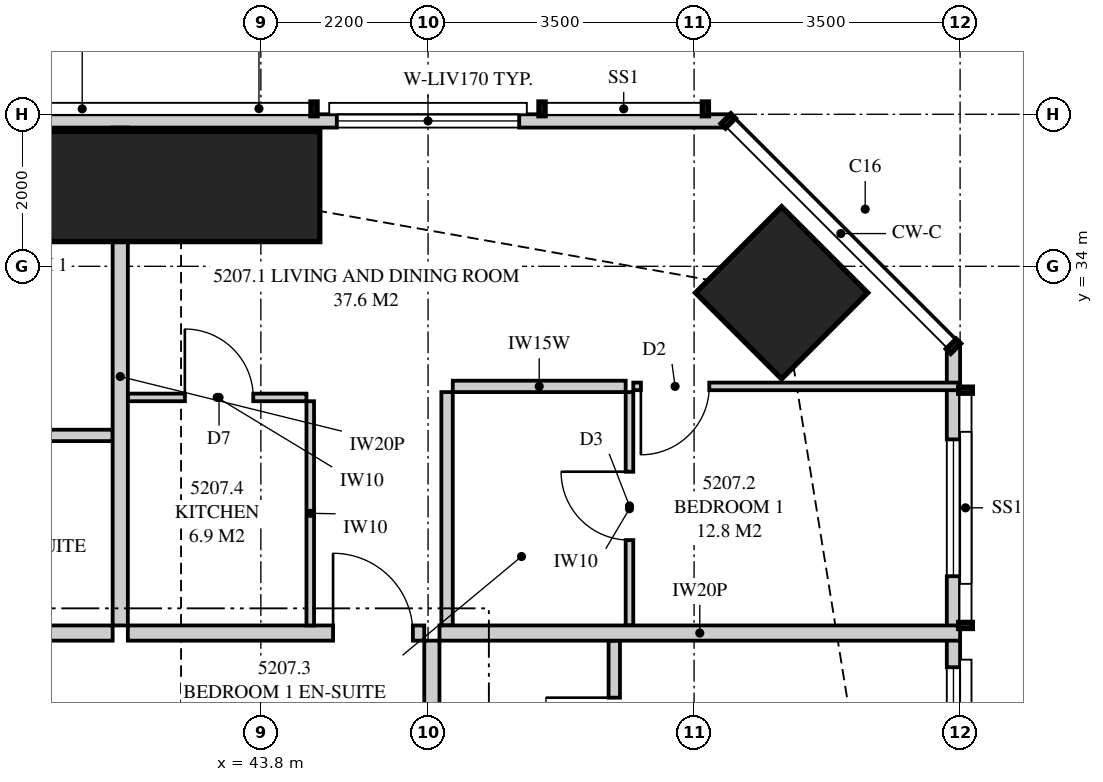
"""IFC4 building model, lengths in metres.
Left out: names, types, materials, properties, quantities, classifications, styles, units other than length and angle.
Written with IfcOpenShell. Run it as: python <this file> out.ifc"""

import sys

from ifc_helpers import new_model, si_unit, direction, frame, frame_2d, origin, origin_2d, place, context, subcontext, project, spatial, polyline, rectangle, outline, extrude, element, fill, save


model = new_model("IFC4")
c1 = context("Model", 3, precision=1e-05, world=origin(), true_north=direction((0.0, 1.0)))
c2 = subcontext(c1, "Body", "Model", "MODEL_VIEW")
j1 = project(units=[si_unit("LENGTHUNIT", "METRE"), si_unit("PLANEANGLEUNIT", "RADIAN")], contexts=[c1])
p1 = place(None, origin())
s1 = spatial("IfcSite", under=j1, at=p1, CompositionType="ELEMENT")
p2 = place(p1, origin())
s2 = spatial("IfcBuilding", under=s1, at=p2, CompositionType="ELEMENT")
p3 = place(p2, frame((0.0, 0.0, 191.2)))
s3 = spatial("IfcBuildingStorey", under=s2, at=p3, CompositionType="ELEMENT", Elevation=191.2)
p4 = place(p3, frame((50.652, 33.652, 0.0), z_axis=(0.0, 0.0, 1.0), x_axis=(0.707106781187, 0.707106781187, 0.0)))
e1 = element("IfcColumn", 1, at=p4, inside=s3, PredefinedType="COLUMN", context=c2, shape_type="SweptSolid", body=[
    extrude(rectangle(XDim=1.6, YDim=1.6, at=origin_2d()), origin(), (0.0, 0.0, 1.0), 3.35),
])
p5 = place(p3, frame((42.75, 35.05, 0.0), z_axis=(0.0, 0.0, 1.0), x_axis=(0.0, 1.0, 0.0)))
e2 = element("IfcColumn", 2, at=p5, inside=s3, PredefinedType="COLUMN", context=c2, shape_type="SweptSolid", body=[
    extrude(rectangle(XDim=1.45, YDim=3.65, at=origin_2d()), origin(), (0.0, 0.0, 1.0), 3.35),
])
p6 = place(p3, frame((52.913, 3.051, 0.0), z_axis=(0.0, 0.0, 1.0), x_axis=(0.0, 1.0, 0.0)))
e3 = element("IfcWall", 3, at=p6, inside=s3, PredefinedType="SOLIDWALL", context=c2, shape_type="SweptSolid", body=[
    extrude(outline(polyline([(0.0, 0.0), (29.897, 0.0), (29.897, 3.11), (22.167, 3.11), (22.167, 2.15), (22.074, 2.15), (22.074, 3.11), (21.949, 3.11), (21.949, 2.15), (9.949, 2.15), (9.949, 3.11), (9.847, 3.11), (9.847, 2.15), (9.706, 2.15), (9.706, 3.11), (0.0, 3.11), (0.0, 0.0)])), frame((0.0, 0.087, 0.0), z_axis=(0.0, -1.0, 0.0), x_axis=(1.0, 0.0, 0.0)), (0.0, 0.0, 1.0), 0.175),
])
p7 = place(p6, frame((1.137, 0.0, 0.4)))
e4 = element("IfcOpeningElement", 4, at=p7, cuts=e3, PredefinedType="OPENING", context=c2, shape_type="SweptSolid", body=[
    extrude(rectangle(XDim=2.4, YDim=1.7, at=frame_2d((1.2, 0.85))), frame((0.0, 0.097, 0.0), z_axis=(0.0, -1.0, 0.0), x_axis=(1.0, 0.0, 0.0)), (0.0, 0.0, 1.0), 0.195),
])
p8 = place(p6, frame((5.674, 0.0, 0.4)))
e5 = element("IfcOpeningElement", 5, at=p8, cuts=e3, PredefinedType="OPENING", context=c2, shape_type="SweptSolid", body=[
    extrude(rectangle(XDim=1.8, YDim=1.7, at=frame_2d((0.9, 0.85))), frame((0.0, 0.097, 0.0), z_axis=(0.0, -1.0, 0.0), x_axis=(1.0, 0.0, 0.0)), (0.0, 0.0, 1.0), 0.195),
])
p9 = place(p6, frame((11.902, 0.0, 0.4)))
e6 = element("IfcOpeningElement", 6, at=p9, cuts=e3, PredefinedType="OPENING", context=c2, shape_type="SweptSolid", body=[
    extrude(rectangle(XDim=2.4, YDim=1.7, at=frame_2d((1.2, 0.85))), frame((0.0, 0.097, 0.0), z_axis=(0.0, -1.0, 0.0), x_axis=(1.0, 0.0, 0.0)), (0.0, 0.0, 1.0), 0.195),
])
p10 = place(p6, frame((15.324, 0.0, 0.0)))
e7 = element("IfcOpeningElement", 7, at=p10, cuts=e3, PredefinedType="OPENING", context=c2, shape_type="SweptSolid", body=[
    extrude(rectangle(XDim=1.8, YDim=2.1, at=frame_2d((0.9, 1.05))), frame((0.0, 0.097, 0.0), z_axis=(0.0, -1.0, 0.0), x_axis=(1.0, 0.0, 0.0)), (0.0, 0.0, 1.0), 0.195),
])
p11 = place(p6, frame((23.874, 0.0, 0.4)))
e8 = element("IfcOpeningElement", 8, at=p11, cuts=e3, PredefinedType="OPENING", context=c2, shape_type="SweptSolid", body=[
    extrude(rectangle(XDim=1.8, YDim=1.7, at=frame_2d((0.9, 0.85))), frame((0.0, 0.097, 0.0), z_axis=(0.0, -1.0, 0.0), x_axis=(1.0, 0.0, 0.0)), (0.0, 0.0, 1.0), 0.195),
])
p12 = place(p6, frame((26.871, 0.0, 0.4)))
e9 = element("IfcOpeningElement", 9, at=p12, cuts=e3, PredefinedType="OPENING", context=c2, shape_type="SweptSolid", body=[
    extrude(rectangle(XDim=1.8, YDim=1.7, at=frame_2d((0.9, 0.85))), frame((0.0, 0.097, 0.0), z_axis=(0.0, -1.0, 0.0), x_axis=(1.0, 0.0, 0.0)), (0.0, 0.0, 1.0), 0.195),
])
p13 = place(p3, frame((49.949, 35.913, 0.0), z_axis=(0.0, 0.0, 1.0), x_axis=(-1.0, 0.0, 0.0)))
e10 = element("IfcWall", 10, at=p13, inside=s3, PredefinedType="SOLIDWALL", context=c2, shape_type="SweptSolid", body=[
    extrude(outline(polyline([(0.0, 0.0), (34.897, 0.0), (34.897, 3.11), (27.91, 3.11), (27.91, 2.15), (27.836, 2.15), (27.836, 3.11), (27.699, 3.11), (27.699, 2.15), (7.199, 2.15), (7.199, 3.11), (7.062, 3.11), (7.062, 2.15), (6.987, 2.15), (6.987, 3.11), (0.0, 3.11), (0.0, 0.0)])), frame((0.0, 0.087, 0.0), z_axis=(0.0, -1.0, 0.0), x_axis=(1.0, 0.0, 0.0)), (0.0, 0.0, 1.0), 0.175),
])
p14 = place(p13, frame((2.75, 0.0, 0.4)))
e11 = element("IfcOpeningElement", 11, at=p14, cuts=e10, PredefinedType="OPENING", context=c2, shape_type="SweptSolid", body=[
    extrude(rectangle(XDim=2.4, YDim=1.7, at=frame_2d((1.2, 0.85))), frame((0.0, 0.097, 0.0), z_axis=(0.0, -1.0, 0.0), x_axis=(1.0, 0.0, 0.0)), (0.0, 0.0, 1.0), 0.195),
])
p15 = place(p13, frame((9.124, 0.0, 0.4)))
e12 = element("IfcOpeningElement", 12, at=p15, cuts=e10, PredefinedType="OPENING", context=c2, shape_type="SweptSolid", body=[
    extrude(rectangle(XDim=1.8, YDim=1.7, at=frame_2d((0.9, 0.85))), frame((0.0, 0.097, 0.0), z_axis=(0.0, -1.0, 0.0), x_axis=(1.0, 0.0, 0.0)), (0.0, 0.0, 1.0), 0.195),
])
p16 = place(p13, frame((13.174, 0.0, 0.0)))
e13 = element("IfcOpeningElement", 13, at=p16, cuts=e10, PredefinedType="OPENING", context=c2, shape_type="SweptSolid", body=[
    extrude(rectangle(XDim=1.8, YDim=2.1, at=frame_2d((0.9, 1.05))), frame((0.0, 0.097, 0.0), z_axis=(0.0, -1.0, 0.0), x_axis=(1.0, 0.0, 0.0)), (0.0, 0.0, 1.0), 0.195),
])
p17 = place(p13, frame((19.849, 0.0, 0.4)))
e14 = element("IfcOpeningElement", 14, at=p17, cuts=e10, PredefinedType="OPENING", context=c2, shape_type="SweptSolid", body=[
    extrude(rectangle(XDim=1.8, YDim=1.7, at=frame_2d((0.9, 0.85))), frame((0.0, 0.097, 0.0), z_axis=(0.0, -1.0, 0.0), x_axis=(1.0, 0.0, 0.0)), (0.0, 0.0, 1.0), 0.195),
])
p18 = place(p13, frame((23.304, 0.0, 0.4)))
e15 = element("IfcOpeningElement", 15, at=p18, cuts=e10, PredefinedType="OPENING", context=c2, shape_type="SweptSolid", body=[
    extrude(rectangle(XDim=2.4, YDim=1.7, at=frame_2d((1.2, 0.85))), frame((0.0, 0.097, 0.0), z_axis=(0.0, -1.0, 0.0), x_axis=(1.0, 0.0, 0.0)), (0.0, 0.0, 1.0), 0.195),
])
p19 = place(p13, frame((30.249, 0.0, 0.4)))
e16 = element("IfcOpeningElement", 16, at=p19, cuts=e10, PredefinedType="OPENING", context=c2, shape_type="SweptSolid", body=[
    extrude(rectangle(XDim=1.8, YDim=1.7, at=frame_2d((0.9, 0.85))), frame((0.0, 0.097, 0.0), z_axis=(0.0, -1.0, 0.0), x_axis=(1.0, 0.0, 0.0)), (0.0, 0.0, 1.0), 0.195),
])
p20 = place(p3, frame((41.95, 35.825, 0.0), z_axis=(0.0, 0.0, 1.0), x_axis=(0.0, -1.0, 0.0)))
e17 = element("IfcWall", 17, at=p20, inside=s3, PredefinedType="PARTITIONING", context=c2, shape_type="SweptSolid", body=[
    extrude(outline(polyline([(0.529, 2.15), (0.0, 2.15), (0.0, 0.0), (0.529, 0.0), (0.529, 0.746), (1.021, 0.746), (1.021, 0.0), (6.55, 0.0), (6.55, 3.11), (1.685, 3.11), (1.685, 2.15), (1.021, 2.15), (1.021, 1.404), (0.529, 1.404), (0.529, 2.15)])), frame((0.0, 0.1, 0.0), z_axis=(0.0, -1.0, 0.0), x_axis=(1.0, 0.0, 0.0)), (0.0, 0.0, 1.0), 0.2),
])
p21 = place(p3, frame((38.4, 31.775, 0.0), z_axis=(0.0, 0.0, 1.0), x_axis=(1.0, 0.0, 0.0)))
e18 = element("IfcWall", 18, at=p21, inside=s3, PredefinedType="PLUMBINGWALL", context=c2, shape_type="SweptSolid", body=[
    extrude(rectangle(XDim=3.45, YDim=0.15, at=frame_2d((1.725, 0.0))), origin(), (0.0, 0.0, 1.0), 3.11),
])
p22 = place(p21, frame((0.4, 0.0, 0.0)))
e19 = element("IfcOpeningElement", 19, at=p22, cuts=e18, PredefinedType="OPENING", context=c2, shape_type="SweptSolid", body=[
    extrude(rectangle(XDim=0.9, YDim=2.1, at=frame_2d((0.45, 1.05))), frame((0.0, 0.085, 0.0), z_axis=(0.0, -1.0, 0.0), x_axis=(1.0, 0.0, 0.0)), (0.0, 0.0, 1.0), 0.17),
])
p23 = place(p3, frame((42.05, 29.175, 0.0), z_axis=(0.0, 0.0, 1.0), x_axis=(1.0, 0.0, 0.0)))
e20 = element("IfcWall", 20, at=p23, inside=s3, PredefinedType="PARTITIONING", context=c2, shape_type="SweptSolid", body=[
    extrude(outline(polyline([(0.0, 0.0), (3.9, 0.0), (3.9, 3.11), (1.037, 3.11), (1.037, 2.541), (0.363, 2.541), (0.363, 3.11), (0.0, 3.11), (0.0, 0.0)])), frame((0.0, 0.1, 0.0), z_axis=(0.0, -1.0, 0.0), x_axis=(1.0, 0.0, 0.0)), (0.0, 0.0, 1.0), 0.2),
])
p24 = place(p23, frame((2.7, 0.0, 0.0)))
e21 = element("IfcOpeningElement", 21, at=p24, cuts=e20, PredefinedType="OPENING", context=c2, shape_type="SweptSolid", body=[
    extrude(rectangle(XDim=1.05, YDim=2.2, at=frame_2d((0.525, 1.1))), frame((0.0, 0.11, 0.0), z_axis=(0.0, -1.0, 0.0), x_axis=(1.0, 0.0, 0.0)), (0.0, 0.0, 1.0), 0.22),
])
p25 = place(p3, frame((48.65, 32.345, 0.0), z_axis=(0.0, 0.0, 1.0), x_axis=(0.0, -1.0, 0.0)))
e22 = element("IfcWall", 22, at=p25, inside=s3, PredefinedType="PARTITIONING", context=c2, shape_type="SweptSolid", body=[
    extrude(rectangle(XDim=3.07, YDim=0.1, at=frame_2d((1.535, 0.0))), origin(), (0.0, 0.0, 1.0), 3.11),
])
p26 = place(p25, frame((1.048, 0.0, 0.0)))
e23 = element("IfcOpeningElement", 23, at=p26, cuts=e22, PredefinedType="OPENING", context=c2, shape_type="SweptSolid", body=[
    extrude(rectangle(XDim=0.9, YDim=2.1, at=frame_2d((0.45, 1.05))), frame((0.0, 0.06, 0.0), z_axis=(0.0, -1.0, 0.0), x_axis=(1.0, 0.0, 0.0)), (0.0, 0.0, 1.0), 0.12),
])
p27 = place(p3, frame((48.7, 32.42, 0.0), z_axis=(0.0, 0.0, 1.0), x_axis=(1.0, 0.0, 0.0)))
e24 = element("IfcWall", 24, at=p27, inside=s3, PredefinedType="PARTITIONING", context=c2, shape_type="SweptSolid", body=[
    extrude(outline(polyline([(0.0, 0.0), (4.3, 0.0), (4.3, 3.11), (3.022, 3.11), (3.022, 2.15), (1.279, 2.15), (1.279, 3.11), (0.0, 3.11), (0.0, 0.0)])), frame((0.0, 0.05, 0.0), z_axis=(0.0, -1.0, 0.0), x_axis=(1.0, 0.0, 0.0)), (0.0, 0.0, 1.0), 0.1),
])
p28 = place(p27, frame((0.1, 0.0, 0.0)))
e25 = element("IfcOpeningElement", 25, at=p28, cuts=e24, PredefinedType="OPENING", context=c2, shape_type="SweptSolid", body=[
    extrude(rectangle(XDim=0.9, YDim=2.1, at=frame_2d((0.45, 1.05))), frame((0.0, 0.06, 0.0), z_axis=(0.0, -1.0, 0.0), x_axis=(1.0, 0.0, 0.0)), (0.0, 0.0, 1.0), 0.12),
])
p29 = place(p3, frame((46.325, 32.42, 0.0), z_axis=(0.0, 0.0, 1.0), x_axis=(1.0, 0.0, 0.0)))
e26 = element("IfcWall", 26, at=p29, inside=s3, PredefinedType="PLUMBINGWALL", context=c2, shape_type="SweptSolid", body=[
    extrude(rectangle(XDim=2.275, YDim=0.15, at=frame_2d((1.138, 0.0))), origin(), (0.0, 0.0, 1.0), 3.11),
])
p30 = place(p3, frame((46.25, 32.345, 0.0), z_axis=(0.0, 0.0, 1.0), x_axis=(0.0, -1.0, 0.0)))
e27 = element("IfcWall", 27, at=p30, inside=s3, PredefinedType="PLUMBINGWALL", context=c2, shape_type="SweptSolid", body=[
    extrude(rectangle(XDim=3.07, YDim=0.15, at=frame_2d((1.535, 0.0))), origin(), (0.0, 0.0, 1.0), 3.11),
])
p31 = place(p3, frame((42.05, 32.275, 0.0), z_axis=(0.0, 0.0, 1.0), x_axis=(1.0, 0.0, 0.0)))
e28 = element("IfcWall", 28, at=p31, inside=s3, PredefinedType="PARTITIONING", context=c2, shape_type="SweptSolid", body=[
    extrude(outline(polyline([(0.0, 0.0), (2.35, 0.0), (2.35, 3.11), (0.987, 3.11), (0.987, 2.541), (0.413, 2.541), (0.413, 3.11), (0.0, 3.11), (0.0, 0.0)])), frame((0.0, 0.05, 0.0), z_axis=(0.0, -1.0, 0.0), x_axis=(1.0, 0.0, 0.0)), (0.0, 0.0, 1.0), 0.1),
])
p32 = place(p31, frame((0.75, 0.0, 0.0)))
e29 = element("IfcOpeningElement", 29, at=p32, cuts=e28, PredefinedType="OPENING", context=c2, shape_type="SweptSolid", body=[
    extrude(rectangle(XDim=0.9, YDim=2.1, at=frame_2d((0.45, 1.05))), frame((0.0, 0.06, 0.0), z_axis=(0.0, -1.0, 0.0), x_axis=(1.0, 0.0, 0.0)), (0.0, 0.0, 1.0), 0.12),
])
p33 = place(p3, frame((44.45, 32.225, 0.0), z_axis=(0.0, 0.0, 1.0), x_axis=(0.0, -1.0, 0.0)))
e30 = element("IfcWall", 30, at=p33, inside=s3, PredefinedType="PARTITIONING", context=c2, shape_type="SweptSolid", body=[
    extrude(rectangle(XDim=2.95, YDim=0.1, at=frame_2d((1.475, 0.0))), origin(), (0.0, 0.0, 1.0), 3.11),
])
p34 = place(p3, frame((46.15, 29.175, 0.0), z_axis=(0.0, 0.0, 1.0), x_axis=(1.0, 0.0, 0.0)))
e31 = element("IfcWall", 31, at=p34, inside=s3, PredefinedType="PARTITIONING", context=c2, shape_type="SweptSolid", body=[
    extrude(outline(polyline([(0.0, 0.0), (6.85, 0.0), (6.85, 3.11), (6.147, 3.11), (6.147, 2.15), (4.303, 2.15), (4.303, 3.11), (0.0, 3.11), (0.0, 0.0)])), frame((0.0, 0.1, 0.0), z_axis=(0.0, -1.0, 0.0), x_axis=(1.0, 0.0, 0.0)), (0.0, 0.0, 1.0), 0.2),
])
p35 = place(p3, frame((48.45, 26.65, 0.0), z_axis=(0.0, 0.0, 1.0), x_axis=(0.0, 1.0, 0.0)))
e32 = element("IfcWall", 32, at=p35, inside=s3, PredefinedType="PLUMBINGWALL", context=c2, shape_type="SweptSolid", body=[
    extrude(rectangle(XDim=2.425, YDim=0.15, at=frame_2d((1.212, 0.0))), origin(), (0.0, 0.0, 1.0), 3.11),
])
p36 = place(p35, frame((0.775, 0.0, 0.0)))
e33 = element("IfcOpeningElement", 33, at=p36, cuts=e32, PredefinedType="OPENING", context=c2, shape_type="SweptSolid", body=[
    extrude(rectangle(XDim=0.9, YDim=2.1, at=frame_2d((0.45, 1.05))), frame((0.0, 0.085, 0.0), z_axis=(0.0, -1.0, 0.0), x_axis=(1.0, 0.0, 0.0)), (0.0, 0.0, 1.0), 0.17),
])
p37 = place(p3, frame((37.875, 29.175, 0.0), z_axis=(0.0, 0.0, 1.0), x_axis=(1.0, 0.0, 0.0)))
e34 = element("IfcWall", 34, at=p37, inside=s3, PredefinedType="PARTITIONING", context=c2, shape_type="SweptSolid", body=[
    extrude(rectangle(XDim=3.975, YDim=0.2, at=frame_2d((1.988, 0.0))), origin(), (0.0, 0.0, 1.0), 3.11),
])
p38 = place(p3, frame((46.05, 26.488, 0.0), z_axis=(0.0, 0.0, 1.0), x_axis=(0.0, 1.0, 0.0)))
e35 = element("IfcWall", 35, at=p38, inside=s3, PredefinedType="PARTITIONING", context=c2, shape_type="SweptSolid", body=[
    extrude(rectangle(XDim=2.587, YDim=0.2, at=frame_2d((1.294, 0.0))), origin(), (0.0, 0.0, 1.0), 3.11),
])
p39 = place(p11, origin())
e36 = element("IfcWindow", 36, at=p39, inside=s3, PartitioningType="SINGLE_PANEL", PredefinedType="WINDOW", context=c2, shape_type="SweptSolid", body=[
    extrude(rectangle(XDim=1.8, YDim=1.7, at=frame_2d((0.9, 0.85))), frame((0.0, 0.03, 0.0), z_axis=(0.0, -1.0, 0.0), x_axis=(1.0, 0.0, 0.0)), (0.0, 0.0, 1.0), 0.06),
])
fill(e8, e36)
p40 = place(p12, origin())
e37 = element("IfcWindow", 37, at=p40, inside=s3, PartitioningType="SINGLE_PANEL", PredefinedType="WINDOW", context=c2, shape_type="SweptSolid", body=[
    extrude(rectangle(XDim=1.8, YDim=1.7, at=frame_2d((0.9, 0.85))), frame((0.0, 0.03, 0.0), z_axis=(0.0, -1.0, 0.0), x_axis=(1.0, 0.0, 0.0)), (0.0, 0.0, 1.0), 0.06),
])
fill(e9, e37)
p41 = place(p14, origin())
e38 = element("IfcWindow", 38, at=p41, inside=s3, PartitioningType="SINGLE_PANEL", PredefinedType="WINDOW", context=c2, shape_type="SweptSolid", body=[
    extrude(rectangle(XDim=2.4, YDim=1.7, at=frame_2d((1.2, 0.85))), frame((0.0, 0.03, 0.0), z_axis=(0.0, -1.0, 0.0), x_axis=(1.0, 0.0, 0.0)), (0.0, 0.0, 1.0), 0.06),
])
fill(e11, e38)
p42 = place(p24, origin())
e39 = element("IfcDoor", 39, at=p42, inside=s3, OperationType="SINGLE_SWING_LEFT", PredefinedType="DOOR", context=c2, shape_type="SweptSolid", body=[
    extrude(rectangle(XDim=1.05, YDim=2.2, at=frame_2d((0.525, 1.1))), frame((0.0, 0.025, 0.0), z_axis=(0.0, -1.0, 0.0), x_axis=(1.0, 0.0, 0.0)), (0.0, 0.0, 1.0), 0.05),
])
fill(e21, e39)
p43 = place(p28, frame((0.9, 0.0, 0.0), z_axis=(0.0, 0.0, 1.0), x_axis=(-1.0, 0.0, 0.0)))
e40 = element("IfcDoor", 40, at=p43, inside=s3, OperationType="SINGLE_SWING_RIGHT", PredefinedType="DOOR", context=c2, shape_type="SweptSolid", body=[
    extrude(rectangle(XDim=0.9, YDim=2.1, at=frame_2d((0.45, 1.05))), frame((0.0, 0.025, 0.0), z_axis=(0.0, -1.0, 0.0), x_axis=(1.0, 0.0, 0.0)), (0.0, 0.0, 1.0), 0.05),
])
fill(e25, e40)
p44 = place(p26, frame((0.9, 0.0, 0.0), z_axis=(0.0, 0.0, 1.0), x_axis=(-1.0, 0.0, 0.0)))
e41 = element("IfcDoor", 41, at=p44, inside=s3, OperationType="SINGLE_SWING_RIGHT", PredefinedType="DOOR", context=c2, shape_type="SweptSolid", body=[
    extrude(rectangle(XDim=0.9, YDim=2.1, at=frame_2d((0.45, 1.05))), frame((0.0, 0.025, 0.0), z_axis=(0.0, -1.0, 0.0), x_axis=(1.0, 0.0, 0.0)), (0.0, 0.0, 1.0), 0.05),
])
fill(e23, e41)
p45 = place(p32, origin())
e42 = element("IfcDoor", 42, at=p45, inside=s3, OperationType="SINGLE_SWING_LEFT", PredefinedType="DOOR", context=c2, shape_type="SweptSolid", body=[
    extrude(rectangle(XDim=0.9, YDim=2.1, at=frame_2d((0.45, 1.05))), frame((0.0, 0.025, 0.0), z_axis=(0.0, -1.0, 0.0), x_axis=(1.0, 0.0, 0.0)), (0.0, 0.0, 1.0), 0.05),
])
fill(e29, e42)
p46 = place(p36, origin())
e43 = element("IfcDoor", 43, at=p46, inside=s3, OperationType="SINGLE_SWING_RIGHT", PredefinedType="DOOR", context=c2, shape_type="SweptSolid", body=[
    extrude(rectangle(XDim=0.9, YDim=2.1, at=frame_2d((0.45, 1.05))), frame((0.0, 0.025, 0.0), z_axis=(0.0, -1.0, 0.0), x_axis=(1.0, 0.0, 0.0)), (0.0, 0.0, 1.0), 0.05),
])
fill(e33, e43)
save(model, sys.argv[1])
